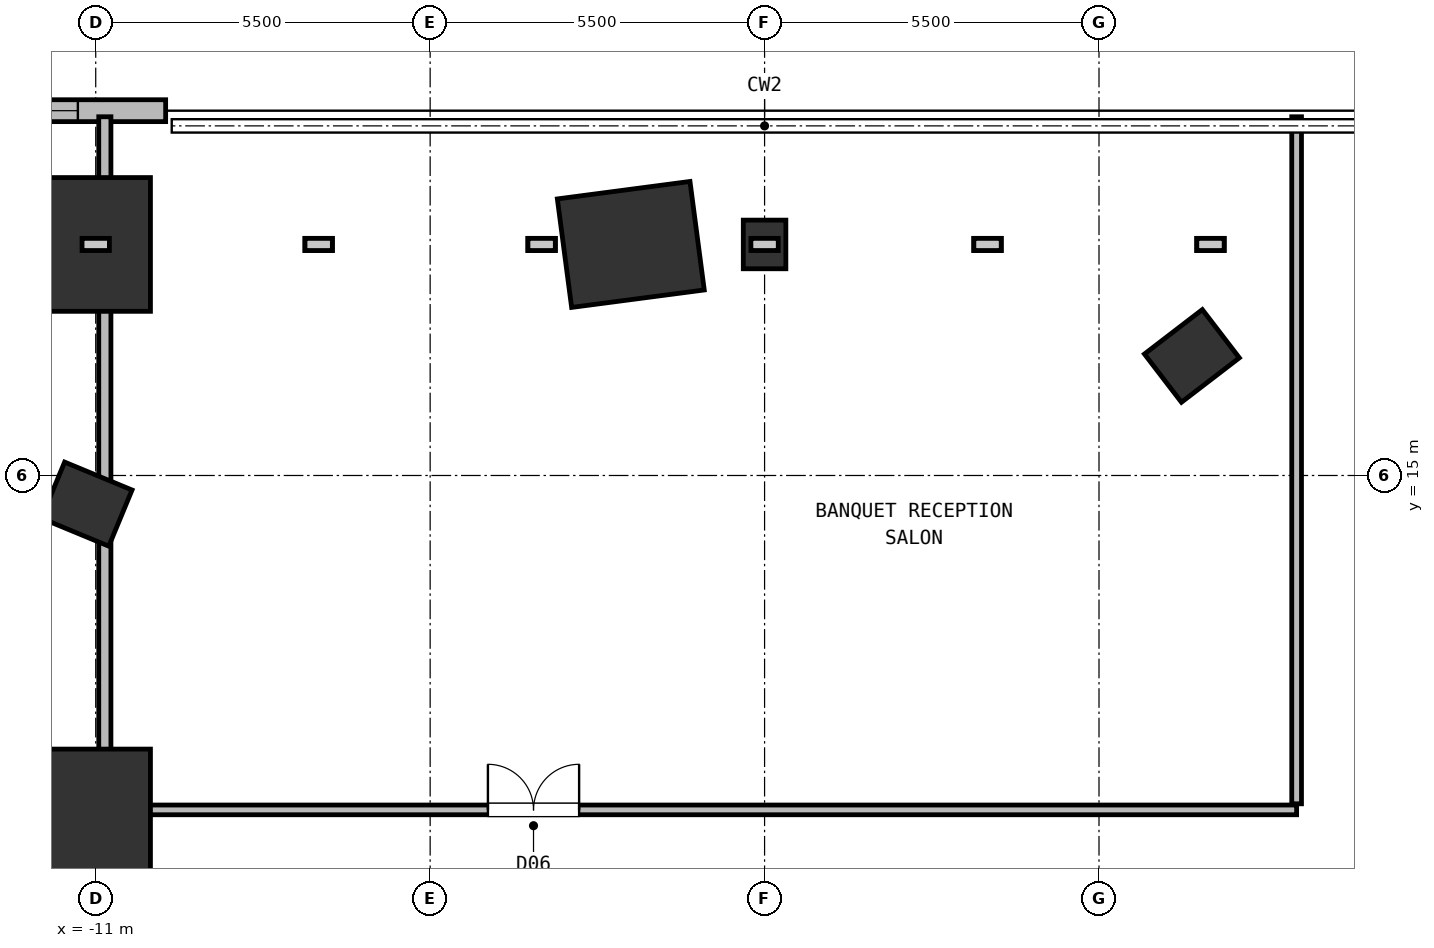
"""IFC4 building model, lengths in metres.
Left out: names, types, materials, properties, quantities, classifications, styles, units other than length and angle.
Written with IfcOpenShell. Run it as: python <this file> out.ifc"""

import sys

from ifc_helpers import new_model, si_unit, direction, frame, frame_2d, origin, origin_2d, place, context, subcontext, project, spatial, rectangle, extrude, element, fill, save


model = new_model("IFC4")
c1 = context("Model", 3, precision=1e-05, world=origin(), true_north=direction((0.0, 1.0)))
c2 = subcontext(c1, "Body", "Model", "MODEL_VIEW")
j1 = project(units=[si_unit("LENGTHUNIT", "METRE"), si_unit("PLANEANGLEUNIT", "RADIAN")], contexts=[c1])
p1 = place(None, origin())
s1 = spatial("IfcSite", under=j1, at=p1, CompositionType="ELEMENT")
p2 = place(p1, origin())
s2 = spatial("IfcBuilding", under=s1, at=p2, CompositionType="ELEMENT")
p3 = place(p2, frame((0.0, 0.0, 16.0)))
s3 = spatial("IfcBuildingStorey", under=s2, at=p3, CompositionType="ELEMENT", Elevation=16.0)
p4 = place(p3, frame((-2.2, 18.8, -0.34), z_axis=(0.0, 0.0, 1.0), x_axis=(-0.13052619222, 0.991444861374, 0.0)))
e1 = element("IfcColumn", 1, at=p4, inside=s3, PredefinedType="COLUMN", context=c2, shape_type="SweptSolid", body=[
    extrude(rectangle(XDim=1.8, YDim=2.2, at=origin_2d()), origin(), (0.0, 0.0, 1.0), 5.84),
])
p5 = place(p3, frame((-11.148, 14.529, 0.0), z_axis=(0.0, 0.0, 1.0), x_axis=(0.382683432365, 0.923879532511, 0.0)))
e2 = element("IfcColumn", 2, at=p5, inside=s3, PredefinedType="COLUMN", context=c2, shape_type="SweptSolid", body=[
    extrude(rectangle(XDim=1.0, YDim=1.2, at=origin_2d()), origin(), (0.0, 0.0, 1.0), 5.5),
])
p6 = place(p3, frame((7.028, 16.966, -0.34), z_axis=(0.0, 0.0, 1.0), x_axis=(-0.608761429009, 0.793353340291, 0.0)))
e3 = element("IfcColumn", 3, at=p6, inside=s3, PredefinedType="COLUMN", context=c2, shape_type="SweptSolid", body=[
    extrude(rectangle(XDim=1.0, YDim=1.2, at=origin_2d()), origin(), (0.0, 0.0, 1.0), 5.84),
])
for number, where, z_axis, x_axis in (
    (4, (-11.0, 9.4, 0.0), (0.0, 0.0, 1.0), (1.0, 0.0, 0.0)),
    (5, (-11.0, 18.8, 0.0), (0.0, 0.0, 1.0), (1.0, 0.0, 0.0)),
):
    element("IfcColumn", number, at=place(p3, frame(where, z_axis=z_axis, x_axis=x_axis)), inside=s3, PredefinedType="COLUMN", context=c2, shape_type="SweptSolid", body=[
        extrude(rectangle(XDim=1.8, YDim=2.2, at=origin_2d()), origin(), (0.0, 0.0, 1.0), 5.5),
    ])
p7 = place(p3, frame((0.0, 18.8, 0.0), z_axis=(0.0, 0.0, 1.0), x_axis=(1.0, 0.0, 0.0)))
e6 = element("IfcColumn", 6, at=p7, inside=s3, PredefinedType="COLUMN", context=c2, shape_type="SweptSolid", body=[
    extrude(rectangle(XDim=0.7, YDim=0.8, at=origin_2d()), origin(), (0.0, 0.0, 1.0), 5.5),
])
p8 = place(p3, frame((-31.0, 21.0, 0.0), z_axis=(0.0, 0.0, 1.0), x_axis=(1.0, 0.0, 0.0)))
e7 = element("IfcWall", 7, at=p8, inside=s3, PredefinedType="SOLIDWALL", context=c2, shape_type="SweptSolid", body=[
    extrude(rectangle(XDim=21.15, YDim=0.36, at=frame_2d((10.575, 0.0))), origin(), (0.0, 0.0, 1.0), 5.22),
])
p9 = place(p8, frame((1.444, 0.0, 0.95)))
e8 = element("IfcOpeningElement", 8, at=p9, cuts=e7, PredefinedType="OPENING", context=c2, shape_type="SweptSolid", body=[
    extrude(rectangle(XDim=2.4, YDim=2.6, at=frame_2d((1.2, 1.3))), frame((0.0, 0.19, 0.0), z_axis=(0.0, -1.0, 0.0), x_axis=(1.0, 0.0, 0.0)), (0.0, 0.0, 1.0), 0.38),
])
p10 = place(p8, frame((6.731, 0.0, 0.95)))
e9 = element("IfcOpeningElement", 9, at=p10, cuts=e7, PredefinedType="OPENING", context=c2, shape_type="SweptSolid", body=[
    extrude(rectangle(XDim=2.4, YDim=2.6, at=frame_2d((1.2, 1.3))), frame((0.0, 0.19, 0.0), z_axis=(0.0, -1.0, 0.0), x_axis=(1.0, 0.0, 0.0)), (0.0, 0.0, 1.0), 0.38),
])
p11 = place(p8, frame((12.019, 0.0, 0.95)))
e10 = element("IfcOpeningElement", 10, at=p11, cuts=e7, PredefinedType="OPENING", context=c2, shape_type="SweptSolid", body=[
    extrude(rectangle(XDim=2.4, YDim=2.6, at=frame_2d((1.2, 1.3))), frame((0.0, 0.19, 0.0), z_axis=(0.0, -1.0, 0.0), x_axis=(1.0, 0.0, 0.0)), (0.0, 0.0, 1.0), 0.38),
])
p12 = place(p8, frame((17.306, 0.0, 0.95)))
e11 = element("IfcOpeningElement", 11, at=p12, cuts=e7, PredefinedType="OPENING", context=c2, shape_type="SweptSolid", body=[
    extrude(rectangle(XDim=2.4, YDim=2.6, at=frame_2d((1.2, 1.3))), frame((0.0, 0.19, 0.0), z_axis=(0.0, -1.0, 0.0), x_axis=(1.0, 0.0, 0.0)), (0.0, 0.0, 1.0), 0.38),
])
p13 = place(p3, frame((-10.85, -20.9, 0.0), z_axis=(0.0, 0.0, 1.0), x_axis=(0.0, 1.0, 0.0)))
e12 = element("IfcWall", 12, at=p13, inside=s3, PredefinedType="PARTITIONING", context=c2, shape_type="SweptSolid", body=[
    extrude(rectangle(XDim=41.8, YDim=0.2, at=frame_2d((20.9, 0.0))), origin(), (0.0, 0.0, 1.0), 4.6),
])
p14 = place(p13, frame((17.0, 0.0, 0.0)))
e13 = element("IfcOpeningElement", 13, at=p14, cuts=e12, PredefinedType="OPENING", context=c2, shape_type="SweptSolid", body=[
    extrude(rectangle(XDim=2.2, YDim=2.3, at=frame_2d((1.1, 1.15))), frame((0.0, 0.11, 0.0), z_axis=(0.0, -1.0, 0.0), x_axis=(1.0, 0.0, 0.0)), (0.0, 0.0, 1.0), 0.22),
])
p15 = place(p3, frame((-10.75, 9.5, 0.0), z_axis=(0.0, 0.0, 1.0), x_axis=(1.0, 0.0, 0.0)))
e14 = element("IfcWall", 14, at=p15, inside=s3, PredefinedType="PARTITIONING", context=c2, shape_type="SweptSolid", body=[
    extrude(rectangle(XDim=19.5, YDim=0.16, at=frame_2d((9.75, 0.0))), origin(), (0.0, 0.0, 1.0), 4.3),
])
p16 = place(p15, frame((6.2, 0.0, 0.0)))
e15 = element("IfcOpeningElement", 15, at=p16, cuts=e14, PredefinedType="OPENING", context=c2, shape_type="SweptSolid", body=[
    extrude(rectangle(XDim=1.5, YDim=2.2, at=frame_2d((0.75, 1.1))), frame((0.0, 0.09, 0.0), z_axis=(0.0, -1.0, 0.0), x_axis=(1.0, 0.0, 0.0)), (0.0, 0.0, 1.0), 0.18),
])
p17 = place(p3, frame((8.75, 9.6, 0.0), z_axis=(0.0, 0.0, 1.0), x_axis=(0.0, 1.0, 0.0)))
e16 = element("IfcWall", 16, at=p17, inside=s3, PredefinedType="PARTITIONING", context=c2, shape_type="SweptSolid", body=[
    extrude(rectangle(XDim=11.3, YDim=0.16, at=frame_2d((5.65, 0.0))), origin(), (0.0, 0.0, 1.0), 5.22),
])
p18 = place(p12, origin())
e17 = element("IfcWindow", 17, at=p18, inside=s3, PartitioningType="SINGLE_PANEL", PredefinedType="WINDOW", context=c2, shape_type="SweptSolid", body=[
    extrude(rectangle(XDim=2.4, YDim=2.6, at=frame_2d((1.2, 1.3))), frame((0.0, 0.03, 0.0), z_axis=(0.0, -1.0, 0.0), x_axis=(1.0, 0.0, 0.0)), (0.0, 0.0, 1.0), 0.06),
])
fill(e11, e17)
p19 = place(p16, origin())
e18 = element("IfcDoor", 18, at=p19, inside=s3, OperationType="DOUBLE_DOOR_SINGLE_SWING", PredefinedType="DOOR", context=c2, shape_type="SweptSolid", body=[
    extrude(rectangle(XDim=1.5, YDim=2.2, at=frame_2d((0.75, 1.1))), frame((0.0, 0.025, 0.0), z_axis=(0.0, -1.0, 0.0), x_axis=(1.0, 0.0, 0.0)), (0.0, 0.0, 1.0), 0.05),
])
fill(e15, e18)
save(model, sys.argv[1])
